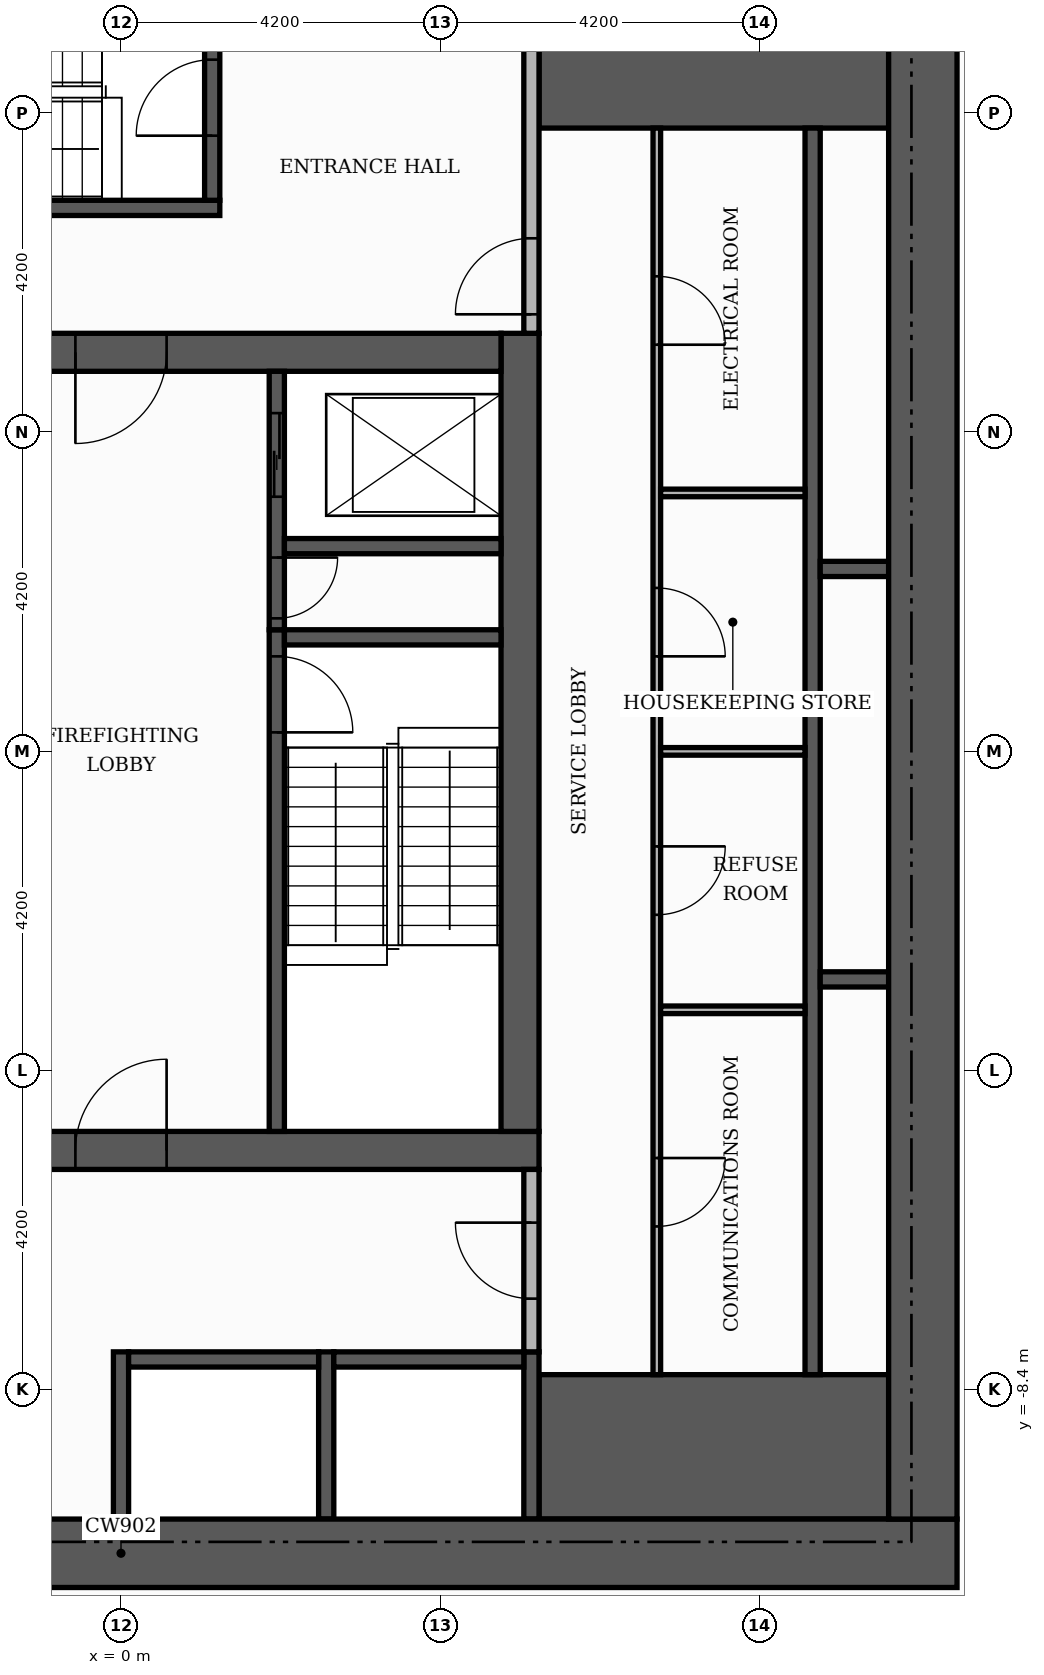
"""IFC4 building model, lengths in metres.
Left out: names, types, materials, properties, quantities, classifications, styles, units other than length and angle.
Written with IfcOpenShell. Run it as: python <this file> out.ifc"""

import sys

from ifc_helpers import new_model, si_unit, direction, frame, frame_2d, origin, place, context, subcontext, project, spatial, rectangle, extrude, element, fill, save


model = new_model("IFC4")
c1 = context("Model", 3, precision=1e-05, world=origin(), true_north=direction((0.0, 1.0)))
c2 = subcontext(c1, "Body", "Model", "MODEL_VIEW")
j1 = project(units=[si_unit("LENGTHUNIT", "METRE"), si_unit("PLANEANGLEUNIT", "RADIAN")], contexts=[c1])
p1 = place(None, origin())
s1 = spatial("IfcSite", under=j1, at=p1, CompositionType="ELEMENT")
p2 = place(p1, origin())
s2 = spatial("IfcBuilding", under=s1, at=p2, CompositionType="ELEMENT")
p3 = place(p2, frame((0.0, 0.0, 90.9)))
s3 = spatial("IfcBuildingStorey", under=s2, at=p3, CompositionType="ELEMENT", Elevation=90.9)
p4 = place(p3, frame((-5.5, -5.25, 0.0), z_axis=(0.0, 0.0, 1.0), x_axis=(1.0, 0.0, 0.0)))
e1 = element("IfcWall", 1, at=p4, inside=s3, PredefinedType="SHEAR", context=c2, shape_type="SweptSolid", body=[
    extrude(rectangle(XDim=11.0, YDim=0.5, at=frame_2d((5.5, 0.0))), origin(), (0.0, 0.0, 1.0), 3.48),
])
p5 = place(p4, frame((4.9, 0.0, 0.0)))
e2 = element("IfcOpeningElement", 2, at=p5, cuts=e1, PredefinedType="OPENING", context=c2, shape_type="SweptSolid", body=[
    extrude(rectangle(XDim=1.2, YDim=2.1, at=frame_2d((0.6, 1.05))), frame((0.0, 0.26, 0.0), z_axis=(0.0, -1.0, 0.0), x_axis=(1.0, 0.0, 0.0)), (0.0, 0.0, 1.0), 0.52),
])
p6 = place(p3, frame((5.25, -5.0, 0.0), z_axis=(0.0, 0.0, 1.0), x_axis=(0.0, 1.0, 0.0)))
e3 = element("IfcWall", 3, at=p6, inside=s3, PredefinedType="SHEAR", context=c2, shape_type="SweptSolid", body=[
    extrude(rectangle(XDim=10.5, YDim=0.5, at=frame_2d((5.25, 0.0))), origin(), (0.0, 0.0, 1.0), 3.48),
])
p7 = place(p3, frame((-5.0, 5.25, 0.0), z_axis=(0.0, 0.0, 1.0), x_axis=(1.0, 0.0, 0.0)))
e4 = element("IfcWall", 4, at=p7, inside=s3, PredefinedType="SHEAR", context=c2, shape_type="SweptSolid", body=[
    extrude(rectangle(XDim=10.0, YDim=0.5, at=frame_2d((5.0, 0.0))), origin(), (0.0, 0.0, 1.0), 3.48),
])
p8 = place(p7, frame((4.4, 0.0, 0.0)))
e5 = element("IfcOpeningElement", 5, at=p8, cuts=e4, PredefinedType="OPENING", context=c2, shape_type="SweptSolid", body=[
    extrude(rectangle(XDim=1.2, YDim=2.1, at=frame_2d((0.6, 1.05))), frame((0.0, 0.26, 0.0), z_axis=(0.0, -1.0, 0.0), x_axis=(1.0, 0.0, 0.0)), (0.0, 0.0, 1.0), 0.52),
])
for number, where, z_axis, x_axis in (
    (6, (5.5, -9.15, 0.0), (0.0, 0.0, 1.0), (1.0, 0.0, 0.0)),
    (7, (5.5, 9.15, 0.0), (0.0, 0.0, 1.0), (1.0, 0.0, 0.0)),
):
    element("IfcWall", number, at=place(p3, frame(where, z_axis=z_axis, x_axis=x_axis)), inside=s3, PredefinedType="SHEAR", context=c2, shape_type="SweptSolid", body=[
        extrude(rectangle(XDim=4.6, YDim=1.9, at=frame_2d((2.3, 0.0))), origin(), (0.0, 0.0, 1.0), 3.48),
    ])
p9 = place(p3, frame((2.05, -5.0, 0.0), z_axis=(0.0, 0.0, 1.0), x_axis=(0.0, 1.0, 0.0)))
e8 = element("IfcWall", 8, at=p9, inside=s3, PredefinedType="SHEAR", context=c2, shape_type="SweptSolid", body=[
    extrude(rectangle(XDim=6.6, YDim=0.2, at=frame_2d((3.3, 0.0))), origin(), (0.0, 0.0, 1.0), 3.48),
])
p10 = place(p9, frame((5.25, 0.0, 0.0)))
e9 = element("IfcOpeningElement", 9, at=p10, cuts=e8, PredefinedType="OPENING", context=c2, shape_type="SweptSolid", body=[
    extrude(rectangle(XDim=1.0, YDim=2.1, at=frame_2d((0.5, 1.05))), frame((0.0, 0.11, 0.0), z_axis=(0.0, -1.0, 0.0), x_axis=(1.0, 0.0, 0.0)), (0.0, 0.0, 1.0), 0.22),
])
p11 = place(p3, frame((2.15, 1.5, 0.0), z_axis=(0.0, 0.0, 1.0), x_axis=(1.0, 0.0, 0.0)))
e10 = element("IfcWall", 10, at=p11, inside=s3, PredefinedType="SHEAR", context=c2, shape_type="SweptSolid", body=[
    extrude(rectangle(XDim=2.85, YDim=0.2, at=frame_2d((1.425, 0.0))), origin(), (0.0, 0.0, 1.0), 3.48),
])
p12 = place(p3, frame((-5.5, 7.15, 0.0), z_axis=(0.0, 0.0, 1.0), x_axis=(1.0, 0.0, 0.0)))
e11 = element("IfcWall", 11, at=p12, inside=s3, PredefinedType="SHEAR", context=c2, shape_type="SweptSolid", body=[
    extrude(rectangle(XDim=6.8, YDim=0.2, at=frame_2d((3.4, 0.0))), origin(), (0.0, 0.0, 1.0), 3.48),
])
p13 = place(p3, frame((1.2, 7.25, 0.0), z_axis=(0.0, 0.0, 1.0), x_axis=(0.0, 1.0, 0.0)))
e12 = element("IfcWall", 12, at=p13, inside=s3, PredefinedType="SHEAR", context=c2, shape_type="SweptSolid", body=[
    extrude(rectangle(XDim=2.85, YDim=0.2, at=frame_2d((1.425, 0.0))), origin(), (0.0, 0.0, 1.0), 3.48),
])
p14 = place(p13, frame((0.85, 0.0, 0.0)))
e13 = element("IfcOpeningElement", 13, at=p14, cuts=e12, PredefinedType="OPENING", context=c2, shape_type="SweptSolid", body=[
    extrude(rectangle(XDim=1.0, YDim=2.1, at=frame_2d((0.5, 1.05))), frame((0.0, 0.11, 0.0), z_axis=(0.0, -1.0, 0.0), x_axis=(1.0, 0.0, 0.0)), (0.0, 0.0, 1.0), 0.22),
])
for number, where, z_axis, x_axis in (
    (14, (0.0, -10.1, 0.0), (0.0, 0.0, 1.0), (0.0, 1.0, 0.0)),
    (15, (2.7, -10.1, 0.0), (0.0, 0.0, 1.0), (0.0, 1.0, 0.0)),
    (16, (5.4, -10.1, 0.0), (0.0, 0.0, 1.0), (0.0, 1.0, 0.0)),
):
    element("IfcWall", number, at=place(p3, frame(where, z_axis=z_axis, x_axis=x_axis)), inside=s3, PredefinedType="SHEAR", context=c2, shape_type="SweptSolid", body=[
        extrude(rectangle(XDim=2.2, YDim=0.2, at=frame_2d((1.1, 0.0))), origin(), (0.0, 0.0, 1.0), 3.48),
    ])
p15 = place(p3, frame((9.1, -8.2, 0.0), z_axis=(0.0, 0.0, 1.0), x_axis=(0.0, 1.0, 0.0)))
e17 = element("IfcWall", 17, at=p15, inside=s3, PredefinedType="SHEAR", context=c2, shape_type="SweptSolid", body=[
    extrude(rectangle(XDim=16.4, YDim=0.2, at=frame_2d((8.2, 0.0))), origin(), (0.0, 0.0, 1.0), 3.48),
])
for number, where, z_axis, x_axis in (
    (18, (0.1, -8.0, 0.0), (0.0, 0.0, 1.0), (1.0, 0.0, 0.0)),
    (19, (2.8, -8.0, 0.0), (0.0, 0.0, 1.0), (1.0, 0.0, 0.0)),
):
    element("IfcWall", number, at=place(p3, frame(where, z_axis=z_axis, x_axis=x_axis)), inside=s3, PredefinedType="SHEAR", context=c2, shape_type="SweptSolid", body=[
        extrude(rectangle(XDim=2.5, YDim=0.2, at=frame_2d((1.25, 0.0))), origin(), (0.0, 0.0, 1.0), 3.48),
    ])
p16 = place(p3, frame((9.2, -3.0, 0.0), z_axis=(0.0, 0.0, 1.0), x_axis=(1.0, 0.0, 0.0)))
e20 = element("IfcWall", 20, at=p16, inside=s3, PredefinedType="SHEAR", context=c2, shape_type="SweptSolid", body=[
    extrude(rectangle(XDim=0.9, YDim=0.2, at=frame_2d((0.45, 0.0))), origin(), (0.0, 0.0, 1.0), 3.48),
])
p17 = place(p3, frame((2.05, 1.6, 0.0), z_axis=(0.0, 0.0, 1.0), x_axis=(0.0, 1.0, 0.0)))
e21 = element("IfcWall", 21, at=p17, inside=s3, PredefinedType="SHEAR", context=c2, shape_type="SweptSolid", body=[
    extrude(rectangle(XDim=3.4, YDim=0.2, at=frame_2d((1.7, 0.0))), origin(), (0.0, 0.0, 1.0), 3.48),
])
p18 = place(p17, frame((1.75, 0.0, 0.0)))
e22 = element("IfcOpeningElement", 22, at=p18, cuts=e21, PredefinedType="OPENING", context=c2, shape_type="SweptSolid", body=[
    extrude(rectangle(XDim=1.1, YDim=2.1, at=frame_2d((0.55, 1.05))), frame((0.0, 0.11, 0.0), z_axis=(0.0, -1.0, 0.0), x_axis=(1.0, 0.0, 0.0)), (0.0, 0.0, 1.0), 0.22),
])
p19 = place(p17, frame((0.15, 0.0, 0.0)))
e23 = element("IfcOpeningElement", 23, at=p19, cuts=e21, PredefinedType="OPENING", context=c2, shape_type="SweptSolid", body=[
    extrude(rectangle(XDim=0.8, YDim=2.1, at=frame_2d((0.4, 1.05))), frame((0.0, 0.11, 0.0), z_axis=(0.0, -1.0, 0.0), x_axis=(1.0, 0.0, 0.0)), (0.0, 0.0, 1.0), 0.22),
])
p20 = place(p3, frame((9.2, 2.4, 0.0), z_axis=(0.0, 0.0, 1.0), x_axis=(1.0, 0.0, 0.0)))
e24 = element("IfcWall", 24, at=p20, inside=s3, PredefinedType="SHEAR", context=c2, shape_type="SweptSolid", body=[
    extrude(rectangle(XDim=0.9, YDim=0.2, at=frame_2d((0.45, 0.0))), origin(), (0.0, 0.0, 1.0), 3.48),
])
p21 = place(p3, frame((2.15, 2.7, 0.0), z_axis=(0.0, 0.0, 1.0), x_axis=(1.0, 0.0, 0.0)))
e25 = element("IfcWall", 25, at=p21, inside=s3, PredefinedType="SHEAR", context=c2, shape_type="SweptSolid", body=[
    extrude(rectangle(XDim=2.85, YDim=0.2, at=frame_2d((1.425, 0.0))), origin(), (0.0, 0.0, 1.0), 3.48),
])
p22 = place(p3, frame((-11.0, -10.55, 0.0), z_axis=(0.0, 0.0, 1.0), x_axis=(1.0, 0.0, 0.0)))
e26 = element("IfcWall", 26, at=p22, inside=s3, PredefinedType="SHEAR", context=c2, shape_type="SweptSolid", body=[
    extrude(rectangle(XDim=22.0, YDim=0.9, at=frame_2d((11.0, 0.0))), origin(), (0.0, 0.0, 1.0), 3.48),
])
p23 = place(p22, frame((7.4, 0.0, 0.0)))
e27 = element("IfcOpeningElement", 27, at=p23, cuts=e26, PredefinedType="OPENING", context=c2, shape_type="SweptSolid", body=[
    extrude(rectangle(XDim=1.8, YDim=2.2, at=frame_2d((0.9, 1.1))), frame((0.0, 0.46, 0.0), z_axis=(0.0, -1.0, 0.0), x_axis=(1.0, 0.0, 0.0)), (0.0, 0.0, 1.0), 0.92),
])
p24 = place(p3, frame((10.55, -10.1, 0.0), z_axis=(0.0, 0.0, 1.0), x_axis=(0.0, 1.0, 0.0)))
e28 = element("IfcWall", 28, at=p24, inside=s3, PredefinedType="SHEAR", context=c2, shape_type="SweptSolid", body=[
    extrude(rectangle(XDim=20.2, YDim=0.9, at=frame_2d((10.1, 0.0))), origin(), (0.0, 0.0, 1.0), 3.48),
])
p25 = place(p3, frame((7.05, -8.2, 0.0), z_axis=(0.0, 0.0, 1.0), x_axis=(0.0, 1.0, 0.0)))
e29 = element("IfcWall", 29, at=p25, inside=s3, PredefinedType="PARTITIONING", context=c2, shape_type="SweptSolid", body=[
    extrude(rectangle(XDim=16.4, YDim=0.1, at=frame_2d((8.2, 0.0))), origin(), (0.0, 0.0, 1.0), 3.48),
])
p26 = place(p25, frame((1.95, 0.0, 0.0)))
e30 = element("IfcOpeningElement", 30, at=p26, cuts=e29, PredefinedType="OPENING", context=c2, shape_type="SweptSolid", body=[
    extrude(rectangle(XDim=0.9, YDim=2.1, at=frame_2d((0.45, 1.05))), frame((0.0, 0.06, 0.0), z_axis=(0.0, -1.0, 0.0), x_axis=(1.0, 0.0, 0.0)), (0.0, 0.0, 1.0), 0.12),
])
p27 = place(p25, frame((6.05, 0.0, 0.0)))
e31 = element("IfcOpeningElement", 31, at=p27, cuts=e29, PredefinedType="OPENING", context=c2, shape_type="SweptSolid", body=[
    extrude(rectangle(XDim=0.9, YDim=2.1, at=frame_2d((0.45, 1.05))), frame((0.0, 0.06, 0.0), z_axis=(0.0, -1.0, 0.0), x_axis=(1.0, 0.0, 0.0)), (0.0, 0.0, 1.0), 0.12),
])
p28 = place(p25, frame((9.45, 0.0, 0.0)))
e32 = element("IfcOpeningElement", 32, at=p28, cuts=e29, PredefinedType="OPENING", context=c2, shape_type="SweptSolid", body=[
    extrude(rectangle(XDim=0.9, YDim=2.1, at=frame_2d((0.45, 1.05))), frame((0.0, 0.06, 0.0), z_axis=(0.0, -1.0, 0.0), x_axis=(1.0, 0.0, 0.0)), (0.0, 0.0, 1.0), 0.12),
])
p29 = place(p25, frame((13.55, 0.0, 0.0)))
e33 = element("IfcOpeningElement", 33, at=p29, cuts=e29, PredefinedType="OPENING", context=c2, shape_type="SweptSolid", body=[
    extrude(rectangle(XDim=0.9, YDim=2.1, at=frame_2d((0.45, 1.05))), frame((0.0, 0.06, 0.0), z_axis=(0.0, -1.0, 0.0), x_axis=(1.0, 0.0, 0.0)), (0.0, 0.0, 1.0), 0.12),
])
p30 = place(p3, frame((5.4, -7.9, 0.0), z_axis=(0.0, 0.0, 1.0), x_axis=(0.0, 1.0, 0.0)))
e34 = element("IfcWall", 34, at=p30, inside=s3, PredefinedType="PARTITIONING", context=c2, shape_type="SweptSolid", body=[
    extrude(rectangle(XDim=2.4, YDim=0.2, at=frame_2d((1.2, 0.0))), origin(), (0.0, 0.0, 1.0), 3.48),
])
p31 = place(p30, frame((0.7, 0.0, 0.0)))
e35 = element("IfcOpeningElement", 35, at=p31, cuts=e34, PredefinedType="OPENING", context=c2, shape_type="SweptSolid", body=[
    extrude(rectangle(XDim=1.0, YDim=2.1, at=frame_2d((0.5, 1.05))), frame((0.0, 0.11, 0.0), z_axis=(0.0, -1.0, 0.0), x_axis=(1.0, 0.0, 0.0)), (0.0, 0.0, 1.0), 0.22),
])
for number, where, z_axis, x_axis in (
    (36, (7.1, -3.4, 0.0), (0.0, 0.0, 1.0), (1.0, 0.0, 0.0)),
    (37, (7.1, 0.0, 0.0), (0.0, 0.0, 1.0), (1.0, 0.0, 0.0)),
    (38, (7.1, 3.4, 0.0), (0.0, 0.0, 1.0), (1.0, 0.0, 0.0)),
):
    element("IfcWall", number, at=place(p3, frame(where, z_axis=z_axis, x_axis=x_axis)), inside=s3, PredefinedType="PARTITIONING", context=c2, shape_type="SweptSolid", body=[
        extrude(rectangle(XDim=1.9, YDim=0.1, at=frame_2d((0.95, 0.0))), origin(), (0.0, 0.0, 1.0), 3.48),
    ])
p32 = place(p3, frame((5.4, 5.5, 0.0), z_axis=(0.0, 0.0, 1.0), x_axis=(0.0, 1.0, 0.0)))
e39 = element("IfcWall", 39, at=p32, inside=s3, PredefinedType="PARTITIONING", context=c2, shape_type="SweptSolid", body=[
    extrude(rectangle(XDim=4.6, YDim=0.2, at=frame_2d((2.3, 0.0))), origin(), (0.0, 0.0, 1.0), 3.48),
])
p33 = place(p32, frame((0.25, 0.0, 0.0)))
e40 = element("IfcOpeningElement", 40, at=p33, cuts=e39, PredefinedType="OPENING", context=c2, shape_type="SweptSolid", body=[
    extrude(rectangle(XDim=1.0, YDim=2.1, at=frame_2d((0.5, 1.05))), frame((0.0, 0.11, 0.0), z_axis=(0.0, -1.0, 0.0), x_axis=(1.0, 0.0, 0.0)), (0.0, 0.0, 1.0), 0.22),
])
p34 = place(p18, origin())
e41 = element("IfcDoor", 41, at=p34, inside=s3, OperationType="SLIDING_TO_LEFT", PredefinedType="DOOR", context=c2, shape_type="SweptSolid", body=[
    extrude(rectangle(XDim=1.1, YDim=2.1, at=frame_2d((0.55, 1.05))), frame((0.0, 0.025, 0.0), z_axis=(0.0, -1.0, 0.0), x_axis=(1.0, 0.0, 0.0)), (0.0, 0.0, 1.0), 0.05),
])
fill(e22, e41)
p35 = place(p10, frame((1.0, 0.0, 0.0), z_axis=(0.0, 0.0, 1.0), x_axis=(-1.0, 0.0, 0.0)))
e42 = element("IfcDoor", 42, at=p35, inside=s3, OperationType="SINGLE_SWING_LEFT", PredefinedType="DOOR", context=c2, shape_type="SweptSolid", body=[
    extrude(rectangle(XDim=1.0, YDim=2.1, at=frame_2d((0.5, 1.05))), frame((0.0, 0.025, 0.0), z_axis=(0.0, -1.0, 0.0), x_axis=(1.0, 0.0, 0.0)), (0.0, 0.0, 1.0), 0.05),
])
fill(e9, e42)
p36 = place(p19, frame((0.8, 0.0, 0.0), z_axis=(0.0, 0.0, 1.0), x_axis=(-1.0, 0.0, 0.0)))
e43 = element("IfcDoor", 43, at=p36, inside=s3, OperationType="SINGLE_SWING_RIGHT", PredefinedType="DOOR", context=c2, shape_type="SweptSolid", body=[
    extrude(rectangle(XDim=0.8, YDim=2.1, at=frame_2d((0.4, 1.05))), frame((0.0, 0.025, 0.0), z_axis=(0.0, -1.0, 0.0), x_axis=(1.0, 0.0, 0.0)), (0.0, 0.0, 1.0), 0.05),
])
fill(e23, e43)
p37 = place(p8, frame((1.2, 0.0, 0.0), z_axis=(0.0, 0.0, 1.0), x_axis=(-1.0, 0.0, 0.0)))
e44 = element("IfcDoor", 44, at=p37, inside=s3, OperationType="SINGLE_SWING_LEFT", PredefinedType="DOOR", context=c2, shape_type="SweptSolid", body=[
    extrude(rectangle(XDim=1.2, YDim=2.1, at=frame_2d((0.6, 1.05))), frame((0.0, 0.025, 0.0), z_axis=(0.0, -1.0, 0.0), x_axis=(1.0, 0.0, 0.0)), (0.0, 0.0, 1.0), 0.05),
])
fill(e5, e44)
p38 = place(p5, origin())
e45 = element("IfcDoor", 45, at=p38, inside=s3, OperationType="SINGLE_SWING_RIGHT", PredefinedType="DOOR", context=c2, shape_type="SweptSolid", body=[
    extrude(rectangle(XDim=1.2, YDim=2.1, at=frame_2d((0.6, 1.05))), frame((0.0, 0.025, 0.0), z_axis=(0.0, -1.0, 0.0), x_axis=(1.0, 0.0, 0.0)), (0.0, 0.0, 1.0), 0.05),
])
fill(e2, e45)
p39 = place(p14, origin())
e46 = element("IfcDoor", 46, at=p39, inside=s3, OperationType="SINGLE_SWING_LEFT", PredefinedType="DOOR", context=c2, shape_type="SweptSolid", body=[
    extrude(rectangle(XDim=1.0, YDim=2.1, at=frame_2d((0.5, 1.05))), frame((0.0, 0.025, 0.0), z_axis=(0.0, -1.0, 0.0), x_axis=(1.0, 0.0, 0.0)), (0.0, 0.0, 1.0), 0.05),
])
fill(e13, e46)
p40 = place(p33, origin())
e47 = element("IfcDoor", 47, at=p40, inside=s3, OperationType="SINGLE_SWING_LEFT", PredefinedType="DOOR", context=c2, shape_type="SweptSolid", body=[
    extrude(rectangle(XDim=1.0, YDim=2.1, at=frame_2d((0.5, 1.05))), frame((0.0, 0.025, 0.0), z_axis=(0.0, -1.0, 0.0), x_axis=(1.0, 0.0, 0.0)), (0.0, 0.0, 1.0), 0.05),
])
fill(e40, e47)
p41 = place(p31, origin())
e48 = element("IfcDoor", 48, at=p41, inside=s3, OperationType="SINGLE_SWING_RIGHT", PredefinedType="DOOR", context=c2, shape_type="SweptSolid", body=[
    extrude(rectangle(XDim=1.0, YDim=2.1, at=frame_2d((0.5, 1.05))), frame((0.0, 0.025, 0.0), z_axis=(0.0, -1.0, 0.0), x_axis=(1.0, 0.0, 0.0)), (0.0, 0.0, 1.0), 0.05),
])
fill(e35, e48)
p42 = place(p26, frame((0.9, 0.0, 0.0), z_axis=(0.0, 0.0, 1.0), x_axis=(-1.0, 0.0, 0.0)))
e49 = element("IfcDoor", 49, at=p42, inside=s3, OperationType="SINGLE_SWING_RIGHT", PredefinedType="DOOR", context=c2, shape_type="SweptSolid", body=[
    extrude(rectangle(XDim=0.9, YDim=2.1, at=frame_2d((0.45, 1.05))), frame((0.0, 0.025, 0.0), z_axis=(0.0, -1.0, 0.0), x_axis=(1.0, 0.0, 0.0)), (0.0, 0.0, 1.0), 0.05),
])
fill(e30, e49)
p43 = place(p27, frame((0.9, 0.0, 0.0), z_axis=(0.0, 0.0, 1.0), x_axis=(-1.0, 0.0, 0.0)))
e50 = element("IfcDoor", 50, at=p43, inside=s3, OperationType="SINGLE_SWING_RIGHT", PredefinedType="DOOR", context=c2, shape_type="SweptSolid", body=[
    extrude(rectangle(XDim=0.9, YDim=2.1, at=frame_2d((0.45, 1.05))), frame((0.0, 0.025, 0.0), z_axis=(0.0, -1.0, 0.0), x_axis=(1.0, 0.0, 0.0)), (0.0, 0.0, 1.0), 0.05),
])
fill(e31, e50)
p44 = place(p28, frame((0.9, 0.0, 0.0), z_axis=(0.0, 0.0, 1.0), x_axis=(-1.0, 0.0, 0.0)))
e51 = element("IfcDoor", 51, at=p44, inside=s3, OperationType="SINGLE_SWING_LEFT", PredefinedType="DOOR", context=c2, shape_type="SweptSolid", body=[
    extrude(rectangle(XDim=0.9, YDim=2.1, at=frame_2d((0.45, 1.05))), frame((0.0, 0.025, 0.0), z_axis=(0.0, -1.0, 0.0), x_axis=(1.0, 0.0, 0.0)), (0.0, 0.0, 1.0), 0.05),
])
fill(e32, e51)
p45 = place(p29, frame((0.9, 0.0, 0.0), z_axis=(0.0, 0.0, 1.0), x_axis=(-1.0, 0.0, 0.0)))
e52 = element("IfcDoor", 52, at=p45, inside=s3, OperationType="SINGLE_SWING_LEFT", PredefinedType="DOOR", context=c2, shape_type="SweptSolid", body=[
    extrude(rectangle(XDim=0.9, YDim=2.1, at=frame_2d((0.45, 1.05))), frame((0.0, 0.025, 0.0), z_axis=(0.0, -1.0, 0.0), x_axis=(1.0, 0.0, 0.0)), (0.0, 0.0, 1.0), 0.05),
])
fill(e33, e52)
save(model, sys.argv[1])
